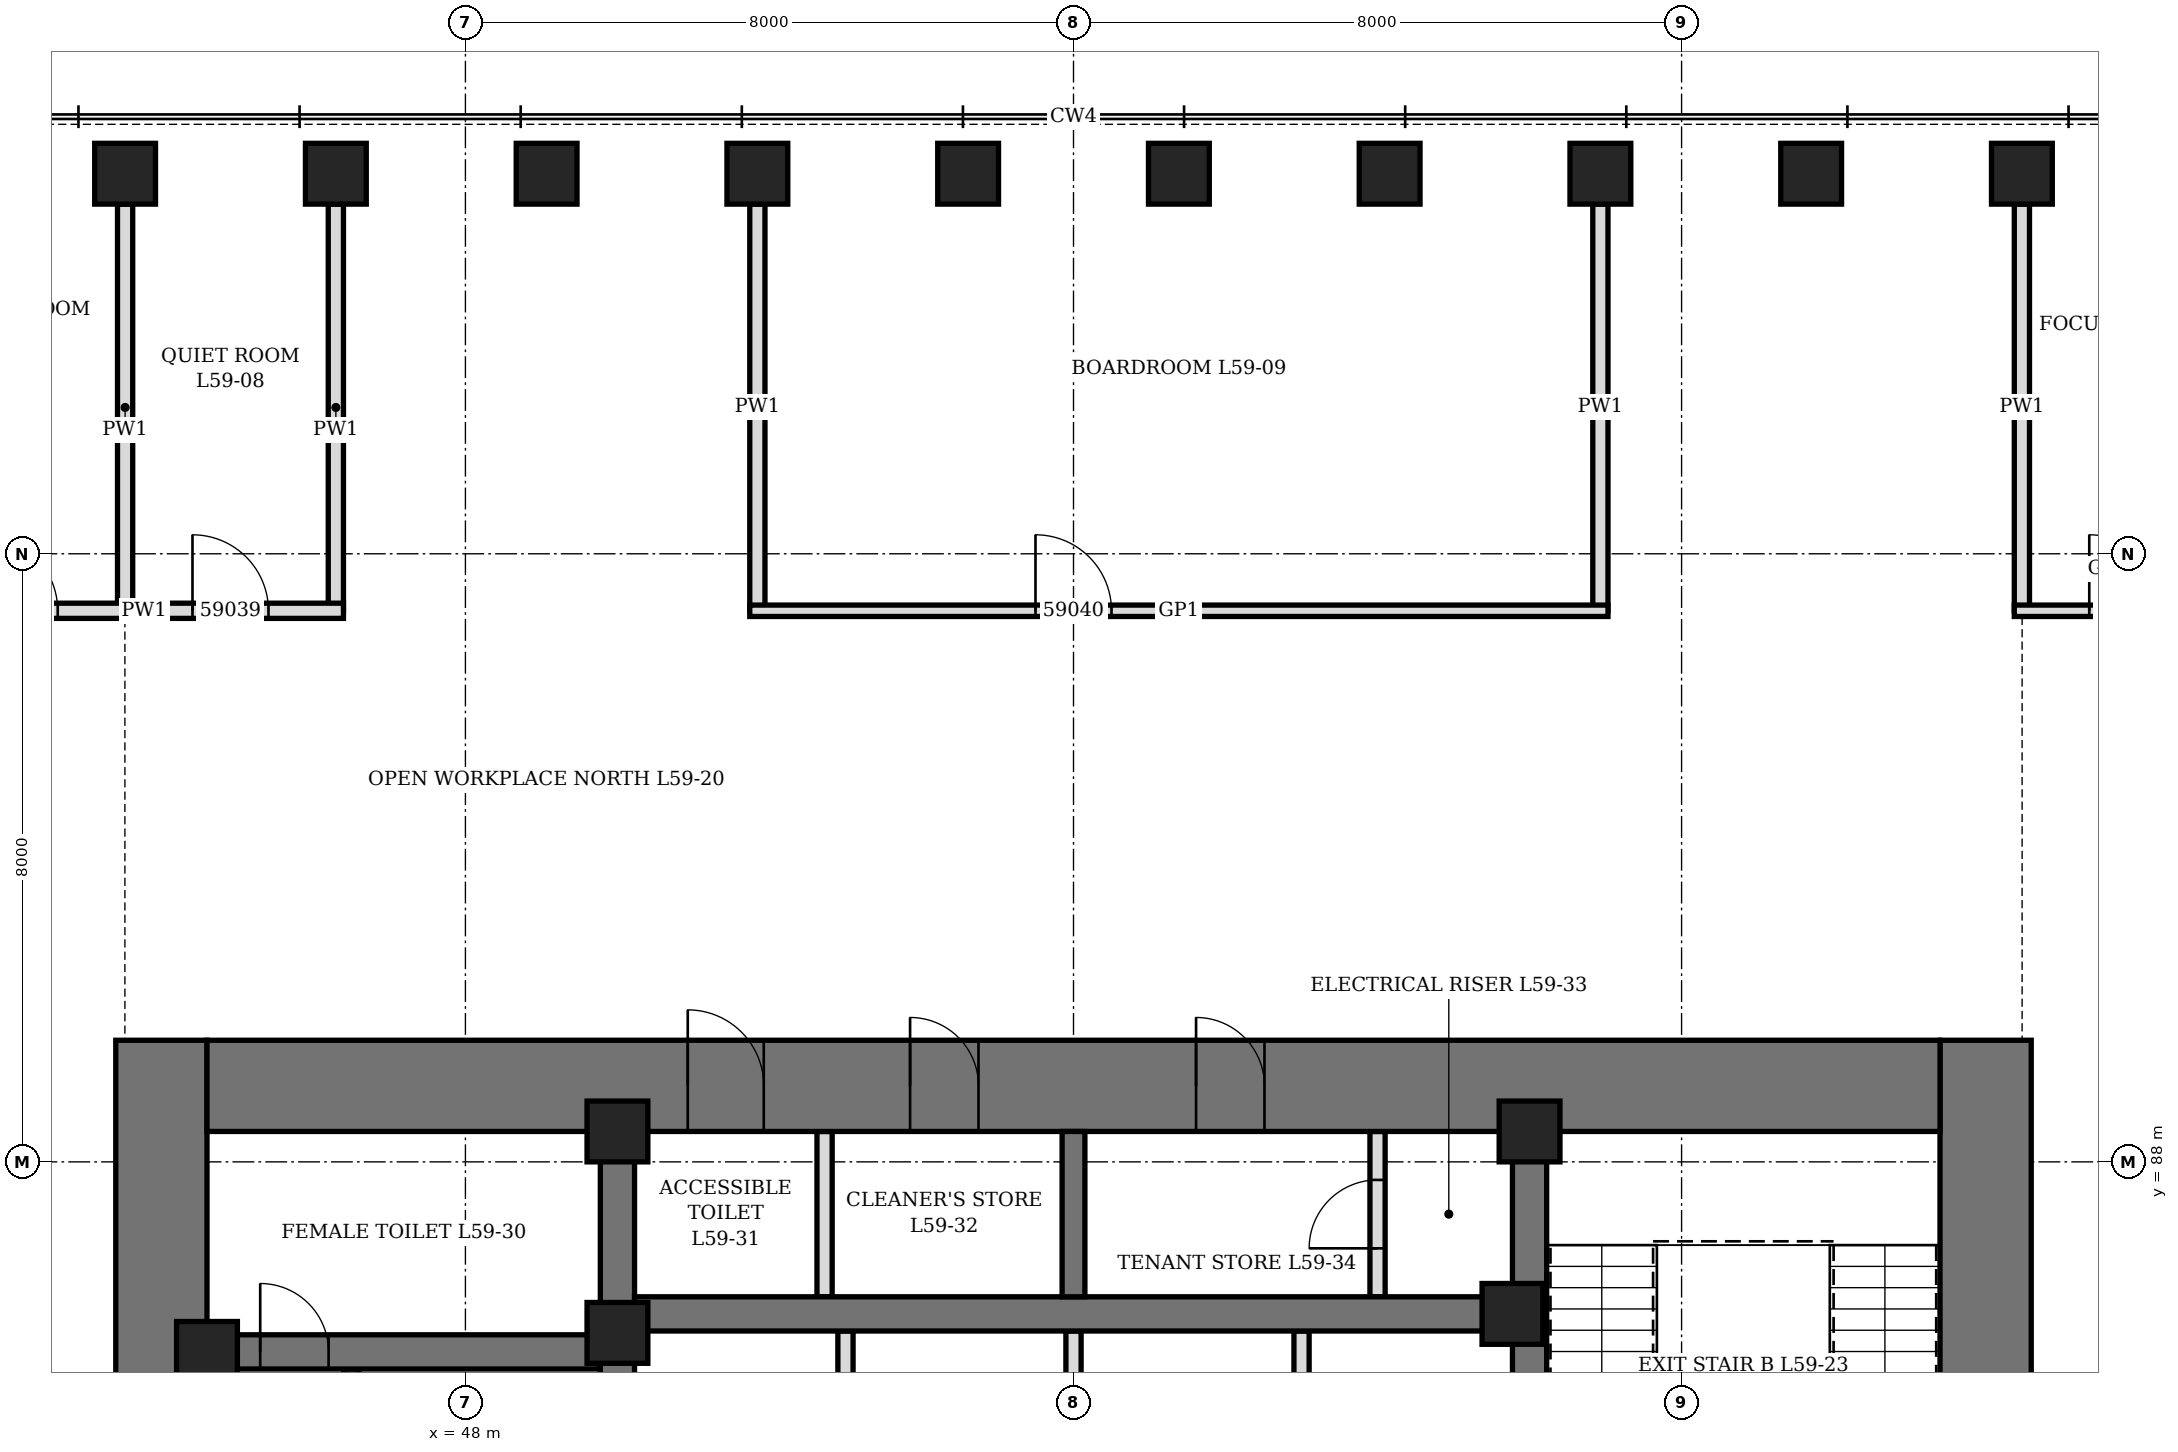
"""IFC4 building model, lengths in metres.
Left out: names, types, materials, properties, quantities, classifications, styles, units other than length and angle.
Written with IfcOpenShell. Run it as: python <this file> out.ifc"""

import sys

from ifc_helpers import new_model, si_unit, direction, frame, frame_2d, origin, origin_2d, place, context, subcontext, project, spatial, rectangle, hollow_rectangle, extrude, element, fill, save


model = new_model("IFC4")
c1 = context("Model", 3, precision=1e-05, world=origin(), true_north=direction((0.0, 1.0)))
c2 = subcontext(c1, "Body", "Model", "MODEL_VIEW")
j1 = project(units=[si_unit("LENGTHUNIT", "METRE"), si_unit("PLANEANGLEUNIT", "RADIAN")], contexts=[c1])
p1 = place(None, origin())
s1 = spatial("IfcSite", under=j1, at=p1, CompositionType="ELEMENT")
p2 = place(p1, origin())
s2 = spatial("IfcBuilding", under=s1, at=p2, CompositionType="ELEMENT")
p3 = place(p2, frame((0.0, 0.0, 262.9)))
s3 = spatial("IfcBuildingStorey", under=s2, at=p3, CompositionType="ELEMENT", Elevation=262.9)
for number, where, z_axis, x_axis in (
    (1, (68.477, 101.0, 0.0), (0.0, 0.0, 1.0), (1.0, 0.0, 0.0)),
    (2, (65.705, 101.0, 0.0), (0.0, 0.0, 1.0), (1.0, 0.0, 0.0)),
    (3, (62.932, 101.0, 0.0), (0.0, 0.0, 1.0), (1.0, 0.0, 0.0)),
    (4, (60.159, 101.0, 0.0), (0.0, 0.0, 1.0), (1.0, 0.0, 0.0)),
    (5, (57.386, 101.0, 0.0), (0.0, 0.0, 1.0), (1.0, 0.0, 0.0)),
    (6, (54.614, 101.0, 0.0), (0.0, 0.0, 1.0), (1.0, 0.0, 0.0)),
    (7, (51.841, 101.0, 0.0), (0.0, 0.0, 1.0), (1.0, 0.0, 0.0)),
    (8, (49.068, 101.0, 0.0), (0.0, 0.0, 1.0), (1.0, 0.0, 0.0)),
    (9, (46.295, 101.0, 0.0), (0.0, 0.0, 1.0), (1.0, 0.0, 0.0)),
    (10, (43.523, 101.0, 0.0), (0.0, 0.0, 1.0), (1.0, 0.0, 0.0)),
):
    element("IfcColumn", number, at=place(p3, frame(where, z_axis=z_axis, x_axis=x_axis)), inside=s3, PredefinedType="COLUMN", context=c2, shape_type="SweptSolid", body=[
        extrude(hollow_rectangle(XDim=0.8, YDim=0.8, WallThickness=0.1, at=origin_2d()), origin(), (0.0, 0.0, 1.0), 4.2),
    ])
p4 = place(p3, frame((44.0, 70.4, 0.0), z_axis=(0.0, 0.0, 1.0), x_axis=(0.0, 1.0, 0.0)))
e11 = element("IfcWall", 11, at=p4, inside=s3, PredefinedType="SHEAR", context=c2, shape_type="SweptSolid", body=[
    extrude(rectangle(XDim=19.2, YDim=1.2, at=frame_2d((9.6, 0.0))), origin(), (0.0, 0.0, 1.0), 4.2),
])
p5 = place(p4, frame((8.6, 0.0, 0.0)))
e12 = element("IfcOpeningElement", 12, at=p5, cuts=e11, PredefinedType="OPENING", context=c2, shape_type="SweptSolid", body=[
    extrude(rectangle(XDim=2.0, YDim=2.4, at=frame_2d((1.0, 1.2))), frame((0.0, 0.61, 0.0), z_axis=(0.0, -1.0, 0.0), x_axis=(1.0, 0.0, 0.0)), (0.0, 0.0, 1.0), 1.22),
])
p6 = place(p3, frame((68.0, 70.4, 0.0), z_axis=(0.0, 0.0, 1.0), x_axis=(0.0, 1.0, 0.0)))
e13 = element("IfcWall", 13, at=p6, inside=s3, PredefinedType="SHEAR", context=c2, shape_type="SweptSolid", body=[
    extrude(rectangle(XDim=19.2, YDim=1.2, at=frame_2d((9.6, 0.0))), origin(), (0.0, 0.0, 1.0), 4.2),
])
p7 = place(p6, frame((8.6, 0.0, 0.0)))
e14 = element("IfcOpeningElement", 14, at=p7, cuts=e13, PredefinedType="OPENING", context=c2, shape_type="SweptSolid", body=[
    extrude(rectangle(XDim=2.0, YDim=2.4, at=frame_2d((1.0, 1.2))), frame((0.0, 0.61, 0.0), z_axis=(0.0, -1.0, 0.0), x_axis=(1.0, 0.0, 0.0)), (0.0, 0.0, 1.0), 1.22),
])
p8 = place(p3, frame((44.6, 89.0, 0.0), z_axis=(0.0, 0.0, 1.0), x_axis=(1.0, 0.0, 0.0)))
e15 = element("IfcWall", 15, at=p8, inside=s3, PredefinedType="SHEAR", context=c2, shape_type="SweptSolid", body=[
    extrude(rectangle(XDim=22.8, YDim=1.2, at=frame_2d((11.4, 0.0))), origin(), (0.0, 0.0, 1.0), 4.2),
])
p9 = place(p8, frame((6.325, 0.0, 0.0)))
e16 = element("IfcOpeningElement", 16, at=p9, cuts=e15, PredefinedType="OPENING", context=c2, shape_type="SweptSolid", body=[
    extrude(rectangle(XDim=1.0, YDim=2.1, at=frame_2d((0.5, 1.05))), frame((0.0, 0.61, 0.0), z_axis=(0.0, -1.0, 0.0), x_axis=(1.0, 0.0, 0.0)), (0.0, 0.0, 1.0), 1.22),
])
p10 = place(p8, frame((9.25, 0.0, 0.0)))
e17 = element("IfcOpeningElement", 17, at=p10, cuts=e15, PredefinedType="OPENING", context=c2, shape_type="SweptSolid", body=[
    extrude(rectangle(XDim=0.9, YDim=2.1, at=frame_2d((0.45, 1.05))), frame((0.0, 0.61, 0.0), z_axis=(0.0, -1.0, 0.0), x_axis=(1.0, 0.0, 0.0)), (0.0, 0.0, 1.0), 1.22),
])
p11 = place(p8, frame((13.012, 0.0, 0.0)))
e18 = element("IfcOpeningElement", 18, at=p11, cuts=e15, PredefinedType="OPENING", context=c2, shape_type="SweptSolid", body=[
    extrude(rectangle(XDim=0.9, YDim=2.1, at=frame_2d((0.45, 1.05))), frame((0.0, 0.61, 0.0), z_axis=(0.0, -1.0, 0.0), x_axis=(1.0, 0.0, 0.0)), (0.0, 0.0, 1.0), 1.22),
])
p12 = place(p3, frame((50.0, 71.6, 0.0), z_axis=(0.0, 0.0, 1.0), x_axis=(0.0, 1.0, 0.0)))
e19 = element("IfcWall", 19, at=p12, inside=s3, PredefinedType="SHEAR", context=c2, shape_type="SweptSolid", body=[
    extrude(rectangle(XDim=16.8, YDim=0.45, at=frame_2d((8.4, 0.0))), origin(), (0.0, 0.0, 1.0), 4.2),
])
p13 = place(p12, frame((7.5, 0.0, 0.0)))
e20 = element("IfcOpeningElement", 20, at=p13, cuts=e19, PredefinedType="OPENING", context=c2, shape_type="SweptSolid", body=[
    extrude(rectangle(XDim=1.8, YDim=2.4, at=frame_2d((0.9, 1.2))), frame((0.0, 0.235, 0.0), z_axis=(0.0, -1.0, 0.0), x_axis=(1.0, 0.0, 0.0)), (0.0, 0.0, 1.0), 0.47),
])
p14 = place(p3, frame((62.0, 71.6, 0.0), z_axis=(0.0, 0.0, 1.0), x_axis=(0.0, 1.0, 0.0)))
e21 = element("IfcWall", 21, at=p14, inside=s3, PredefinedType="SHEAR", context=c2, shape_type="SweptSolid", body=[
    extrude(rectangle(XDim=16.8, YDim=0.45, at=frame_2d((8.4, 0.0))), origin(), (0.0, 0.0, 1.0), 4.2),
])
p15 = place(p14, frame((7.5, 0.0, 0.0)))
e22 = element("IfcOpeningElement", 22, at=p15, cuts=e21, PredefinedType="OPENING", context=c2, shape_type="SweptSolid", body=[
    extrude(rectangle(XDim=1.8, YDim=2.4, at=frame_2d((0.9, 1.2))), frame((0.0, 0.235, 0.0), z_axis=(0.0, -1.0, 0.0), x_axis=(1.0, 0.0, 0.0)), (0.0, 0.0, 1.0), 0.47),
])
p16 = place(p3, frame((44.6, 85.5, 0.0), z_axis=(0.0, 0.0, 1.0), x_axis=(1.0, 0.0, 0.0)))
e23 = element("IfcWall", 23, at=p16, inside=s3, PredefinedType="SHEAR", context=c2, shape_type="SweptSolid", body=[
    extrude(rectangle(XDim=5.175, YDim=0.45, at=frame_2d((2.587, 0.0))), origin(), (0.0, 0.0, 1.0), 4.2),
])
p17 = place(p16, frame((0.7, 0.0, 0.0)))
e24 = element("IfcOpeningElement", 24, at=p17, cuts=e23, PredefinedType="OPENING", context=c2, shape_type="SweptSolid", body=[
    extrude(rectangle(XDim=0.9, YDim=2.1, at=frame_2d((0.45, 1.05))), frame((0.0, 0.235, 0.0), z_axis=(0.0, -1.0, 0.0), x_axis=(1.0, 0.0, 0.0)), (0.0, 0.0, 1.0), 0.47),
])
p18 = place(p3, frame((50.225, 86.0, 0.0), z_axis=(0.0, 0.0, 1.0), x_axis=(1.0, 0.0, 0.0)))
e25 = element("IfcWall", 25, at=p18, inside=s3, PredefinedType="SHEAR", context=c2, shape_type="SweptSolid", body=[
    extrude(rectangle(XDim=11.55, YDim=0.45, at=frame_2d((5.775, 0.0))), origin(), (0.0, 0.0, 1.0), 4.2),
])
p19 = place(p3, frame((56.0, 86.225, 0.0), z_axis=(0.0, 0.0, 1.0), x_axis=(0.0, 1.0, 0.0)))
e26 = element("IfcWall", 26, at=p19, inside=s3, PredefinedType="SHEAR", context=c2, shape_type="SweptSolid", body=[
    extrude(rectangle(XDim=2.175, YDim=0.3, at=frame_2d((1.087, 0.0))), origin(), (0.0, 0.0, 1.0), 4.2),
])
for number, where, z_axis, x_axis in (
    (27, (44.6, 85.5, 0.0), (0.0, 0.0, 1.0), (1.0, 0.0, 0.0)),
    (28, (50.0, 85.75, 0.0), (0.0, 0.0, 1.0), (1.0, 0.0, 0.0)),
    (29, (50.0, 88.4, 0.0), (0.0, 0.0, 1.0), (1.0, 0.0, 0.0)),
    (30, (61.775, 86.0, 0.0), (0.0, 0.0, 1.0), (1.0, 0.0, 0.0)),
    (31, (62.0, 88.4, 0.0), (0.0, 0.0, 1.0), (1.0, 0.0, 0.0)),
):
    element("IfcColumn", number, at=place(p3, frame(where, z_axis=z_axis, x_axis=x_axis)), inside=s3, PredefinedType="COLUMN", context=c2, shape_type="SweptSolid", body=[
        extrude(hollow_rectangle(XDim=0.8, YDim=0.8, WallThickness=0.1, at=origin_2d()), origin(), (0.0, 0.0, 1.0), 4.2),
    ])
p20 = place(p3, frame((46.5, 82.225, 0.0), z_axis=(0.0, 0.0, 1.0), x_axis=(0.0, 1.0, 0.0)))
e32 = element("IfcWall", 32, at=p20, inside=s3, PredefinedType="PARTITIONING", context=c2, shape_type="SweptSolid", body=[
    extrude(rectangle(XDim=3.05, YDim=0.2, at=frame_2d((1.525, 0.0))), origin(), (0.0, 0.0, 1.0), 4.04),
])
p21 = place(p20, frame((1.075, 0.0, 0.0)))
e33 = element("IfcOpeningElement", 33, at=p21, cuts=e32, PredefinedType="OPENING", context=c2, shape_type="SweptSolid", body=[
    extrude(rectangle(XDim=0.9, YDim=2.1, at=frame_2d((0.45, 1.05))), frame((0.0, 0.11, 0.0), z_axis=(0.0, -1.0, 0.0), x_axis=(1.0, 0.0, 0.0)), (0.0, 0.0, 1.0), 0.22),
])
p22 = place(p3, frame((52.725, 86.225, 0.0), z_axis=(0.0, 0.0, 1.0), x_axis=(0.0, 1.0, 0.0)))
e34 = element("IfcWall", 34, at=p22, inside=s3, PredefinedType="PARTITIONING", context=c2, shape_type="SweptSolid", body=[
    extrude(rectangle(XDim=2.175, YDim=0.2, at=frame_2d((1.087, 0.0))), origin(), (0.0, 0.0, 1.0), 4.04),
])
p23 = place(p3, frame((60.0, 86.225, 0.0), z_axis=(0.0, 0.0, 1.0), x_axis=(0.0, 1.0, 0.0)))
e35 = element("IfcWall", 35, at=p23, inside=s3, PredefinedType="PARTITIONING", context=c2, shape_type="SweptSolid", body=[
    extrude(rectangle(XDim=2.175, YDim=0.2, at=frame_2d((1.087, 0.0))), origin(), (0.0, 0.0, 1.0), 4.04),
])
p24 = place(p23, frame((0.637, 0.0, 0.0)))
e36 = element("IfcOpeningElement", 36, at=p24, cuts=e35, PredefinedType="OPENING", context=c2, shape_type="SweptSolid", body=[
    extrude(rectangle(XDim=0.9, YDim=2.1, at=frame_2d((0.45, 1.05))), frame((0.0, 0.11, 0.0), z_axis=(0.0, -1.0, 0.0), x_axis=(1.0, 0.0, 0.0)), (0.0, 0.0, 1.0), 0.22),
])
p25 = place(p3, frame((53.0, 82.225, 0.0), z_axis=(0.0, 0.0, 1.0), x_axis=(0.0, 1.0, 0.0)))
e37 = element("IfcWall", 37, at=p25, inside=s3, PredefinedType="PARTITIONING", context=c2, shape_type="SweptSolid", body=[
    extrude(rectangle(XDim=3.55, YDim=0.2, at=frame_2d((1.775, 0.0))), origin(), (0.0, 0.0, 1.0), 4.04),
])
p26 = place(p3, frame((56.0, 82.225, 0.0), z_axis=(0.0, 0.0, 1.0), x_axis=(0.0, 1.0, 0.0)))
e38 = element("IfcWall", 38, at=p26, inside=s3, PredefinedType="PARTITIONING", context=c2, shape_type="SweptSolid", body=[
    extrude(rectangle(XDim=3.55, YDim=0.2, at=frame_2d((1.775, 0.0))), origin(), (0.0, 0.0, 1.0), 3.14),
])
p27 = place(p3, frame((59.0, 82.225, 0.0), z_axis=(0.0, 0.0, 1.0), x_axis=(0.0, 1.0, 0.0)))
e39 = element("IfcWall", 39, at=p27, inside=s3, PredefinedType="PARTITIONING", context=c2, shape_type="SweptSolid", body=[
    extrude(rectangle(XDim=3.55, YDim=0.2, at=frame_2d((1.775, 0.0))), origin(), (0.0, 0.0, 1.0), 4.04),
])
for number, where, z_axis, x_axis in (
    (40, (43.523, 95.25, 0.0), (0.0, 0.0, 1.0), (0.0, 1.0, 0.0)),
    (41, (46.295, 95.25, 0.0), (0.0, 0.0, 1.0), (0.0, 1.0, 0.0)),
    (42, (51.841, 95.25, 0.0), (0.0, 0.0, 1.0), (0.0, 1.0, 0.0)),
    (43, (62.932, 95.25, 0.0), (0.0, 0.0, 1.0), (0.0, 1.0, 0.0)),
    (44, (68.477, 95.25, 0.0), (0.0, 0.0, 1.0), (0.0, 1.0, 0.0)),
):
    element("IfcWall", number, at=place(p3, frame(where, z_axis=z_axis, x_axis=x_axis)), inside=s3, PredefinedType="PARTITIONING", context=c2, shape_type="SweptSolid", body=[
        extrude(rectangle(XDim=5.35, YDim=0.2, at=frame_2d((2.675, 0.0))), origin(), (0.0, 0.0, 1.0), 3.428),
    ])
p28 = place(p3, frame((51.741, 95.25, 0.0), z_axis=(0.0, 0.0, 1.0), x_axis=(1.0, 0.0, 0.0)))
e45 = element("IfcWall", 45, at=p28, inside=s3, PredefinedType="PARTITIONING", context=c2, shape_type="SweptSolid", body=[
    extrude(rectangle(XDim=11.291, YDim=0.15, at=frame_2d((5.646, 0.0))), origin(), (0.0, 0.0, 1.0), 4.04),
])
p29 = place(p28, frame((3.759, 0.0, 0.0)))
e46 = element("IfcOpeningElement", 46, at=p29, cuts=e45, PredefinedType="OPENING", context=c2, shape_type="SweptSolid", body=[
    extrude(rectangle(XDim=1.0, YDim=2.4, at=frame_2d((0.5, 1.2))), frame((0.0, 0.085, 0.0), z_axis=(0.0, -1.0, 0.0), x_axis=(1.0, 0.0, 0.0)), (0.0, 0.0, 1.0), 0.17),
])
p30 = place(p3, frame((68.377, 95.25, 0.0), z_axis=(0.0, 0.0, 1.0), x_axis=(1.0, 0.0, 0.0)))
e47 = element("IfcWall", 47, at=p30, inside=s3, PredefinedType="PARTITIONING", context=c2, shape_type="SweptSolid", body=[
    extrude(rectangle(XDim=2.473, YDim=0.15, at=frame_2d((1.236, 0.0))), origin(), (0.0, 0.0, 1.0), 4.04),
])
p31 = place(p30, frame((0.986, 0.0, 0.0)))
e48 = element("IfcOpeningElement", 48, at=p31, cuts=e47, PredefinedType="OPENING", context=c2, shape_type="SweptSolid", body=[
    extrude(rectangle(XDim=1.0, YDim=2.4, at=frame_2d((0.5, 1.2))), frame((0.0, 0.085, 0.0), z_axis=(0.0, -1.0, 0.0), x_axis=(1.0, 0.0, 0.0)), (0.0, 0.0, 1.0), 0.17),
])
p32 = place(p3, frame((41.15, 95.25, 0.0), z_axis=(0.0, 0.0, 1.0), x_axis=(1.0, 0.0, 0.0)))
e49 = element("IfcWall", 49, at=p32, inside=s3, PredefinedType="PARTITIONING", context=c2, shape_type="SweptSolid", body=[
    extrude(rectangle(XDim=5.246, YDim=0.2, at=frame_2d((2.623, 0.0))), origin(), (0.0, 0.0, 1.0), 4.04),
])
p33 = place(p32, frame((0.486, 0.0, 0.0)))
e50 = element("IfcOpeningElement", 50, at=p33, cuts=e49, PredefinedType="OPENING", context=c2, shape_type="SweptSolid", body=[
    extrude(rectangle(XDim=1.0, YDim=2.1, at=frame_2d((0.5, 1.05))), frame((0.0, 0.11, 0.0), z_axis=(0.0, -1.0, 0.0), x_axis=(1.0, 0.0, 0.0)), (0.0, 0.0, 1.0), 0.22),
])
p34 = place(p32, frame((3.259, 0.0, 0.0)))
e51 = element("IfcOpeningElement", 51, at=p34, cuts=e49, PredefinedType="OPENING", context=c2, shape_type="SweptSolid", body=[
    extrude(rectangle(XDim=1.0, YDim=2.1, at=frame_2d((0.5, 1.05))), frame((0.0, 0.11, 0.0), z_axis=(0.0, -1.0, 0.0), x_axis=(1.0, 0.0, 0.0)), (0.0, 0.0, 1.0), 0.22),
])
p35 = place(p17, origin())
e52 = element("IfcDoor", 52, at=p35, inside=s3, OperationType="SINGLE_SWING_RIGHT", PredefinedType="DOOR", context=c2, shape_type="SweptSolid", body=[
    extrude(rectangle(XDim=0.9, YDim=2.1, at=frame_2d((0.45, 1.05))), frame((0.0, 0.225, 0.0), z_axis=(0.0, -1.0, 0.0), x_axis=(1.0, 0.0, 0.0)), (0.0, 0.0, 1.0), 0.449),
])
fill(e24, e52)
p36 = place(p9, origin())
e53 = element("IfcDoor", 53, at=p36, inside=s3, OperationType="SINGLE_SWING_LEFT", PredefinedType="DOOR", context=c2, shape_type="SweptSolid", body=[
    extrude(rectangle(XDim=1.0, YDim=2.1, at=frame_2d((0.5, 1.05))), frame((0.0, 0.35, 0.0), z_axis=(0.0, -1.0, 0.0), x_axis=(1.0, 0.0, 0.0)), (0.0, 0.0, 1.0), 0.7),
])
fill(e16, e53)
p37 = place(p10, origin())
e54 = element("IfcDoor", 54, at=p37, inside=s3, OperationType="SINGLE_SWING_LEFT", PredefinedType="DOOR", context=c2, shape_type="SweptSolid", body=[
    extrude(rectangle(XDim=0.9, YDim=2.1, at=frame_2d((0.45, 1.05))), frame((0.0, 0.35, 0.0), z_axis=(0.0, -1.0, 0.0), x_axis=(1.0, 0.0, 0.0)), (0.0, 0.0, 1.0), 0.7),
])
fill(e17, e54)
p38 = place(p11, origin())
e55 = element("IfcDoor", 55, at=p38, inside=s3, OperationType="SINGLE_SWING_LEFT", PredefinedType="DOOR", context=c2, shape_type="SweptSolid", body=[
    extrude(rectangle(XDim=0.9, YDim=2.1, at=frame_2d((0.45, 1.05))), frame((0.0, 0.35, 0.0), z_axis=(0.0, -1.0, 0.0), x_axis=(1.0, 0.0, 0.0)), (0.0, 0.0, 1.0), 0.7),
])
fill(e18, e55)
p39 = place(p24, origin())
e56 = element("IfcDoor", 56, at=p39, inside=s3, OperationType="SINGLE_SWING_LEFT", PredefinedType="DOOR", context=c2, shape_type="SweptSolid", body=[
    extrude(rectangle(XDim=0.9, YDim=2.1, at=frame_2d((0.45, 1.05))), frame((0.0, 0.1, 0.0), z_axis=(0.0, -1.0, 0.0), x_axis=(1.0, 0.0, 0.0)), (0.0, 0.0, 1.0), 0.199),
])
fill(e36, e56)
p40 = place(p33, origin())
e57 = element("IfcDoor", 57, at=p40, inside=s3, OperationType="SINGLE_SWING_LEFT", PredefinedType="DOOR", context=c2, shape_type="SweptSolid", body=[
    extrude(rectangle(XDim=1.0, YDim=2.1, at=frame_2d((0.5, 1.05))), frame((0.0, 0.1, 0.0), z_axis=(0.0, -1.0, 0.0), x_axis=(1.0, 0.0, 0.0)), (0.0, 0.0, 1.0), 0.199),
])
fill(e50, e57)
p41 = place(p34, origin())
e58 = element("IfcDoor", 58, at=p41, inside=s3, OperationType="SINGLE_SWING_LEFT", PredefinedType="DOOR", context=c2, shape_type="SweptSolid", body=[
    extrude(rectangle(XDim=1.0, YDim=2.1, at=frame_2d((0.5, 1.05))), frame((0.0, 0.1, 0.0), z_axis=(0.0, -1.0, 0.0), x_axis=(1.0, 0.0, 0.0)), (0.0, 0.0, 1.0), 0.199),
])
fill(e51, e58)
p42 = place(p29, origin())
e59 = element("IfcDoor", 59, at=p42, inside=s3, OperationType="SINGLE_SWING_RIGHT", PredefinedType="DOOR", context=c2, shape_type="SweptSolid", body=[
    extrude(rectangle(XDim=1.0, YDim=2.4, at=frame_2d((0.5, 1.2))), frame((0.0, 0.075, 0.0), z_axis=(0.0, -1.0, 0.0), x_axis=(1.0, 0.0, 0.0)), (0.0, 0.0, 1.0), 0.149),
])
fill(e46, e59)
p43 = place(p31, origin())
e60 = element("IfcDoor", 60, at=p43, inside=s3, OperationType="SINGLE_SWING_RIGHT", PredefinedType="DOOR", context=c2, shape_type="SweptSolid", body=[
    extrude(rectangle(XDim=1.0, YDim=2.4, at=frame_2d((0.5, 1.2))), frame((0.0, 0.075, 0.0), z_axis=(0.0, -1.0, 0.0), x_axis=(1.0, 0.0, 0.0)), (0.0, 0.0, 1.0), 0.149),
])
fill(e48, e60)
save(model, sys.argv[1])
